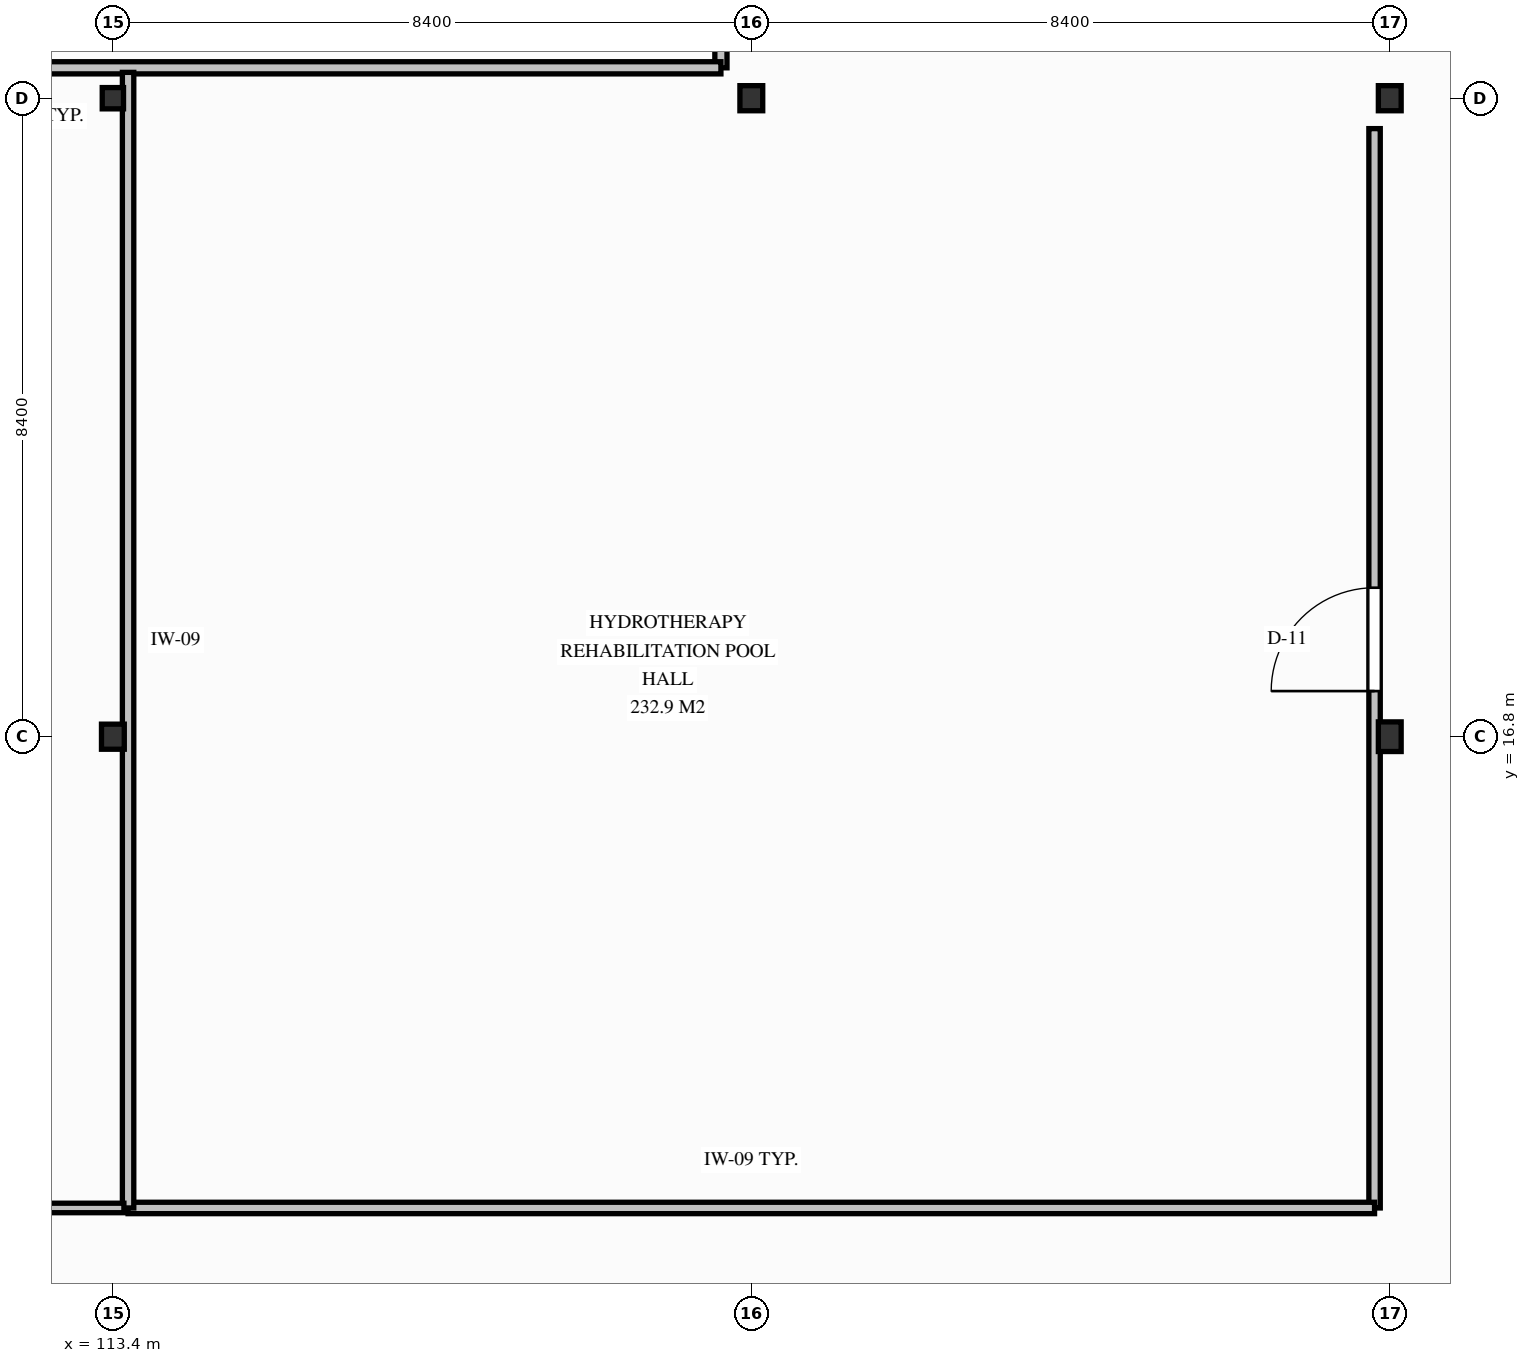
"""IFC4 building model, lengths in metres.
Left out: names, types, materials, properties, quantities, classifications, styles, units other than length and angle.
Written with IfcOpenShell. Run it as: python <this file> out.ifc"""

import sys

from ifc_helpers import new_model, si_unit, direction, frame, frame_2d, origin, origin_2d, place, context, subcontext, project, spatial, rectangle, i_section, extrude, element, fill, save


model = new_model("IFC4")
c1 = context("Model", 3, precision=1e-05, world=origin(), true_north=direction((0.0, 1.0)))
c2 = subcontext(c1, "Body", "Model", "MODEL_VIEW")
j1 = project(units=[si_unit("LENGTHUNIT", "METRE"), si_unit("PLANEANGLEUNIT", "RADIAN")], contexts=[c1])
p1 = place(None, origin())
s1 = spatial("IfcSite", under=j1, at=p1, CompositionType="ELEMENT")
p2 = place(p1, origin())
s2 = spatial("IfcBuilding", under=s1, at=p2, CompositionType="ELEMENT")
p3 = place(p2, origin())
s3 = spatial("IfcBuildingStorey", under=s2, at=p3, CompositionType="ELEMENT", Elevation=0.0)
p4 = place(p3, frame((113.4, 16.8, 0.0), z_axis=(0.0, 0.0, 1.0), x_axis=(1.0, 0.0, 0.0)))
e1 = element("IfcColumn", 1, at=p4, inside=s3, PredefinedType="COLUMN", context=c2, shape_type="SweptSolid", body=[
    extrude(i_section(OverallWidth=0.3, OverallDepth=0.33, WebThickness=0.01, FlangeThickness=0.017, FilletRadius=0.027, at=origin_2d()), origin(), (0.0, 0.0, 1.0), 4.5),
])
p5 = place(p3, frame((113.4, 25.2, 0.0), z_axis=(0.0, 0.0, 1.0), x_axis=(1.0, 0.0, 0.0)))
e2 = element("IfcColumn", 2, at=p5, inside=s3, PredefinedType="COLUMN", context=c2, shape_type="SweptSolid", body=[
    extrude(i_section(OverallWidth=0.28, OverallDepth=0.28, WebThickness=0.01, FlangeThickness=0.018, FilletRadius=0.024, at=origin_2d()), origin(), (0.0, 0.0, 1.0), 4.5),
])
p6 = place(p3, frame((121.8, 25.2, 0.0), z_axis=(0.0, 0.0, 1.0), x_axis=(1.0, 0.0, 0.0)))
e3 = element("IfcColumn", 3, at=p6, inside=s3, PredefinedType="COLUMN", context=c2, shape_type="SweptSolid", body=[
    extrude(i_section(OverallWidth=0.3, OverallDepth=0.33, WebThickness=0.01, FlangeThickness=0.017, FilletRadius=0.027, at=origin_2d()), origin(), (0.0, 0.0, 1.0), 4.5),
])
p7 = place(p3, frame((130.2, 16.8, 0.0), z_axis=(0.0, 0.0, 1.0), x_axis=(1.0, 0.0, 0.0)))
e4 = element("IfcColumn", 4, at=p7, inside=s3, PredefinedType="COLUMN", context=c2, shape_type="SweptSolid", body=[
    extrude(i_section(OverallWidth=0.3, OverallDepth=0.39, WebThickness=0.011, FlangeThickness=0.019, FilletRadius=0.027, at=origin_2d()), origin(), (0.0, 0.0, 1.0), 4.5),
])
p8 = place(p3, frame((130.2, 25.2, 0.0), z_axis=(0.0, 0.0, 1.0), x_axis=(1.0, 0.0, 0.0)))
e5 = element("IfcColumn", 5, at=p8, inside=s3, PredefinedType="COLUMN", context=c2, shape_type="SweptSolid", body=[
    extrude(i_section(OverallWidth=0.3, OverallDepth=0.33, WebThickness=0.01, FlangeThickness=0.017, FilletRadius=0.027, at=origin_2d()), origin(), (0.0, 0.0, 1.0), 4.5),
])
p9 = place(p3, frame((121.4, 34.59, 0.0), z_axis=(0.0, 0.0, 1.0), x_axis=(0.0, -1.0, 0.0)))
e6 = element("IfcWall", 6, at=p9, inside=s3, PredefinedType="PARTITIONING", context=c2, shape_type="SweptSolid", body=[
    extrude(rectangle(XDim=8.99, YDim=0.16, at=frame_2d((4.495, 0.0))), origin(), (0.0, 0.0, 1.0), 3.838),
])
p10 = place(p9, frame((4.24, 0.0, 0.0)))
e7 = element("IfcOpeningElement", 7, at=p10, cuts=e6, PredefinedType="OPENING", context=c2, shape_type="SweptSolid", body=[
    extrude(rectangle(XDim=1.68, YDim=2.26, at=frame_2d((0.84, 1.13))), frame((0.0, 0.09, 0.0), z_axis=(0.0, -1.0, 0.0), x_axis=(1.0, 0.0, 0.0)), (0.0, 0.0, 1.0), 0.18),
])
p11 = place(p3, frame((121.4, 25.6, 0.0), z_axis=(0.0, 0.0, 1.0), x_axis=(-1.0, 0.0, 0.0)))
e8 = element("IfcWall", 8, at=p11, inside=s3, PredefinedType="PARTITIONING", context=c2, shape_type="SweptSolid", body=[
    extrude(rectangle(XDim=24.2, YDim=0.16, at=frame_2d((12.1, 0.0))), origin(), (0.0, 0.0, 1.0), 3.928),
])
p12 = place(p3, frame((130.0, 10.6, 0.0), z_axis=(0.0, 0.0, 1.0), x_axis=(0.0, 1.0, 0.0)))
e9 = element("IfcWall", 9, at=p12, inside=s3, PredefinedType="PARTITIONING", context=c2, shape_type="SweptSolid", body=[
    extrude(rectangle(XDim=14.2, YDim=0.15, at=frame_2d((7.1, 0.0))), origin(), (0.0, 0.0, 1.0), 3.628),
])
p13 = place(p12, frame((6.8, 0.0, 0.0)))
e10 = element("IfcOpeningElement", 10, at=p13, cuts=e9, PredefinedType="OPENING", context=c2, shape_type="SweptSolid", body=[
    extrude(rectangle(XDim=1.36, YDim=2.2, at=frame_2d((0.68, 1.1))), frame((0.0, 0.085, 0.0), z_axis=(0.0, -1.0, 0.0), x_axis=(1.0, 0.0, 0.0)), (0.0, 0.0, 1.0), 0.17),
])
p14 = place(p3, frame((113.6, 10.6, 0.0), z_axis=(0.0, 0.0, 1.0), x_axis=(1.0, 0.0, 0.0)))
e11 = element("IfcWall", 11, at=p14, inside=s3, PredefinedType="PARTITIONING", context=c2, shape_type="SweptSolid", body=[
    extrude(rectangle(XDim=16.4, YDim=0.15, at=frame_2d((8.2, 0.0))), origin(), (0.0, 0.0, 1.0), 3.628),
])
p15 = place(p3, frame((113.6, 25.54, 0.0), z_axis=(0.0, 0.0, 1.0), x_axis=(0.0, -1.0, 0.0)))
e12 = element("IfcWall", 12, at=p15, inside=s3, PredefinedType="PARTITIONING", context=c2, shape_type="SweptSolid", body=[
    extrude(rectangle(XDim=14.94, YDim=0.15, at=frame_2d((7.47, 0.0))), origin(), (0.0, 0.0, 1.0), 3.788),
])
p16 = place(p3, frame((105.337, 10.6, 0.0), z_axis=(0.0, 0.0, 1.0), x_axis=(1.0, 0.0, 0.0)))
e13 = element("IfcWall", 13, at=p16, inside=s3, PredefinedType="PARTITIONING", context=c2, shape_type="SweptSolid", body=[
    extrude(rectangle(XDim=8.208, YDim=0.125, at=frame_2d((4.104, 0.0))), origin(), (0.0, 0.0, 1.0), 3.828),
])
p17 = place(p16, frame((3.413, 0.0, 0.0)))
e14 = element("IfcOpeningElement", 14, at=p17, cuts=e13, PredefinedType="OPENING", context=c2, shape_type="SweptSolid", body=[
    extrude(rectangle(XDim=1.02, YDim=2.15, at=frame_2d((0.51, 1.075))), frame((0.0, 0.073, 0.0), z_axis=(0.0, -1.0, 0.0), x_axis=(1.0, 0.0, 0.0)), (0.0, 0.0, 1.0), 0.145),
])
p18 = place(p13, origin())
e15 = element("IfcDoor", 15, at=p18, inside=s3, OperationType="SINGLE_SWING_LEFT", PredefinedType="DOOR", context=c2, shape_type="SweptSolid", body=[
    extrude(rectangle(XDim=1.36, YDim=2.2, at=frame_2d((0.68, 1.1))), frame((0.0, 0.025, 0.0), z_axis=(0.0, -1.0, 0.0), x_axis=(1.0, 0.0, 0.0)), (0.0, 0.0, 1.0), 0.05),
])
fill(e10, e15)
save(model, sys.argv[1])
